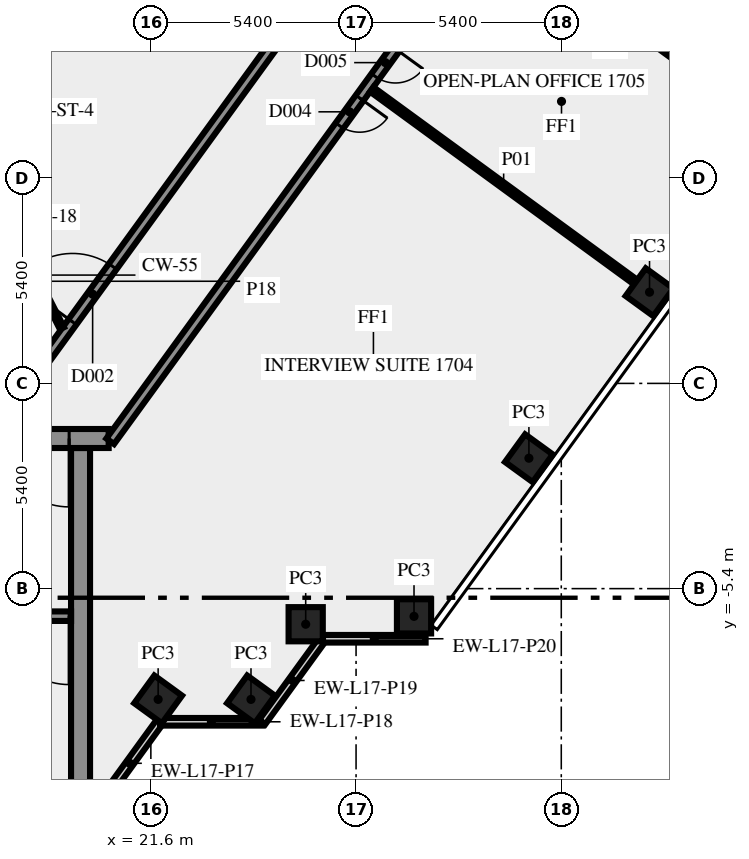
"""IFC4 building model, lengths in metres.
Left out: names, types, materials, properties, quantities, classifications, styles, units other than length and angle.
Written with IfcOpenShell. Run it as: python <this file> out.ifc"""

import sys

from ifc_helpers import new_model, si_unit, direction, frame, frame_2d, origin, origin_2d, place, context, subcontext, project, spatial, rectangle, extrude, element, fill, save


model = new_model("IFC4")
c1 = context("Model", 3, precision=1e-05, world=origin(), true_north=direction((0.0, 1.0)))
c2 = subcontext(c1, "Body", "Model", "MODEL_VIEW")
j1 = project(units=[si_unit("LENGTHUNIT", "METRE"), si_unit("PLANEANGLEUNIT", "RADIAN")], contexts=[c1])
p1 = place(None, origin())
s1 = spatial("IfcSite", under=j1, at=p1, CompositionType="ELEMENT")
p2 = place(p1, origin())
s2 = spatial("IfcBuilding", under=s1, at=p2, CompositionType="ELEMENT")
p3 = place(p2, frame((0.0, 0.0, 75.0)))
s3 = spatial("IfcBuildingStorey", under=s2, at=p3, CompositionType="ELEMENT", Elevation=75.0)
for number, where, z_axis, x_axis in (
    (1, (21.792, -8.315, 0.0), (0.0, 0.0, 1.0), (0.588, 0.809, 0.0)),
    (2, (24.235, -8.315, 0.0), (0.0, 0.0, 1.0), (0.588, 0.809, 0.0)),
    (3, (25.674, -6.337, 0.0), (0.0, 0.0, 1.0), (1.0, 0.0, 0.0)),
    (4, (28.525, -6.13, 0.0), (0.0, 0.0, 1.0), (1.0, 0.0, 0.0)),
    (5, (31.548, -1.969, 0.0), (0.0, 0.0, 1.0), (0.588, 0.809, 0.0)),
    (6, (34.722, 2.4, 0.0), (0.0, 0.0, 1.0), (0.588, 0.809, 0.0)),
):
    element("IfcColumn", number, at=place(p3, frame(where, z_axis=z_axis, x_axis=x_axis)), inside=s3, PredefinedType="COLUMN", context=c2, shape_type="SweptSolid", body=[
        extrude(rectangle(XDim=0.9, YDim=0.9, at=origin_2d()), origin(), (0.0, 0.0, 1.0), 3.4),
    ])
p4 = place(p3, frame((20.253, -11.083, 0.0), z_axis=(0.0, 0.0, 1.0), x_axis=(0.587766567315, 0.809030569476, 0.0)))
e7 = element("IfcWall", 7, at=p4, inside=s3, PredefinedType="SOLIDWALL", context=c2, shape_type="SweptSolid", body=[
    extrude(rectangle(XDim=2.688, YDim=0.2, at=frame_2d((1.344, 0.0))), origin(), (0.0, 0.0, 1.0), 3.4),
])
p5 = place(p3, frame((21.843, -8.904, 0.0), z_axis=(0.0, 0.0, 1.0), x_axis=(1.0, 0.0, 0.0)))
e8 = element("IfcWall", 8, at=p5, inside=s3, PredefinedType="SOLIDWALL", context=c2, shape_type="SweptSolid", body=[
    extrude(rectangle(XDim=2.7, YDim=0.2, at=frame_2d((1.35, 0.0))), origin(), (0.0, 0.0, 1.0), 3.4),
])
p6 = place(p3, frame((24.533, -8.909, 0.0), z_axis=(0.0, 0.0, 1.0), x_axis=(0.587720002413, 0.809064397168, 0.0)))
e9 = element("IfcWall", 9, at=p6, inside=s3, PredefinedType="SOLIDWALL", context=c2, shape_type="SweptSolid", body=[
    extrude(rectangle(XDim=2.7, YDim=0.2, at=frame_2d((1.35, 0.0))), origin(), (0.0, 0.0, 1.0), 3.4),
])
p7 = place(p3, frame((26.13, -6.719, 0.0), z_axis=(0.0, 0.0, 1.0), x_axis=(1.0, 0.0, 0.0)))
e10 = element("IfcWall", 10, at=p7, inside=s3, PredefinedType="SOLIDWALL", context=c2, shape_type="SweptSolid", body=[
    extrude(rectangle(XDim=2.7, YDim=0.2, at=frame_2d((1.35, 0.0))), origin(), (0.0, 0.0, 1.0), 3.4),
])
p8 = place(p3, frame((19.75, -10.5, 0.0), z_axis=(0.0, 0.0, 1.0), x_axis=(0.0, 1.0, 0.0)))
e11 = element("IfcWall", 11, at=p8, inside=s3, PredefinedType="SHEAR", context=c2, shape_type="SweptSolid", body=[
    extrude(rectangle(XDim=8.8, YDim=0.5, at=frame_2d((4.4, 0.0))), origin(), (0.0, 0.0, 1.0), 3.4),
])
p9 = place(p3, frame((19.5, -6.125, 0.0), z_axis=(0.0, 0.0, 1.0), x_axis=(-1.0, 0.0, 0.0)))
e12 = element("IfcWall", 12, at=p9, inside=s3, PredefinedType="SHEAR", context=c2, shape_type="SweptSolid", body=[
    extrude(rectangle(XDim=8.05, YDim=0.25, at=frame_2d((4.025, 0.0))), origin(), (0.0, 0.0, 1.0), 3.4),
])
p10 = place(p9, frame((0.05, 0.0, 0.0)))
e13 = element("IfcOpeningElement", 13, at=p10, cuts=e12, PredefinedType="OPENING", context=c2, shape_type="SweptSolid", body=[
    extrude(rectangle(XDim=1.8, YDim=2.1, at=frame_2d((0.9, 1.05))), frame((0.0, 0.135, 0.0), z_axis=(0.0, -1.0, 0.0), x_axis=(1.0, 0.0, 0.0)), (0.0, 0.0, 1.0), 0.27),
])
p11 = place(p3, frame((20.49, -1.45, 0.0), z_axis=(0.0, 0.0, 1.0), x_axis=(-1.0, 0.0, 0.0)))
e14 = element("IfcWall", 14, at=p11, inside=s3, PredefinedType="SHEAR", context=c2, shape_type="SweptSolid", body=[
    extrude(rectangle(XDim=40.98, YDim=0.5, at=frame_2d((20.49, 0.0))), origin(), (0.0, 0.0, 1.0), 3.4),
])
p12 = place(p11, frame((38.14, 0.0, 0.0)))
e15 = element("IfcOpeningElement", 15, at=p12, cuts=e14, PredefinedType="OPENING", context=c2, shape_type="SweptSolid", body=[
    extrude(rectangle(XDim=1.8, YDim=2.1, at=frame_2d((0.9, 1.05))), frame((0.0, 0.26, 0.0), z_axis=(0.0, -1.0, 0.0), x_axis=(1.0, 0.0, 0.0)), (0.0, 0.0, 1.0), 0.52),
])
p13 = place(p11, frame((35.89, 0.0, 0.0)))
e16 = element("IfcOpeningElement", 16, at=p13, cuts=e14, PredefinedType="OPENING", context=c2, shape_type="SweptSolid", body=[
    extrude(rectangle(XDim=0.9, YDim=2.1, at=frame_2d((0.45, 1.05))), frame((0.0, 0.26, 0.0), z_axis=(0.0, -1.0, 0.0), x_axis=(1.0, 0.0, 0.0)), (0.0, 0.0, 1.0), 0.52),
])
p14 = place(p11, frame((32.94, 0.0, 0.0)))
e17 = element("IfcOpeningElement", 17, at=p14, cuts=e14, PredefinedType="OPENING", context=c2, shape_type="SweptSolid", body=[
    extrude(rectangle(XDim=0.9, YDim=2.1, at=frame_2d((0.45, 1.05))), frame((0.0, 0.26, 0.0), z_axis=(0.0, -1.0, 0.0), x_axis=(1.0, 0.0, 0.0)), (0.0, 0.0, 1.0), 0.52),
])
p15 = place(p11, frame((21.765, 0.0, 0.0)))
e18 = element("IfcOpeningElement", 18, at=p15, cuts=e14, PredefinedType="OPENING", context=c2, shape_type="SweptSolid", body=[
    extrude(rectangle(XDim=2.0, YDim=2.1, at=frame_2d((1.0, 1.05))), frame((0.0, 0.26, 0.0), z_axis=(0.0, -1.0, 0.0), x_axis=(1.0, 0.0, 0.0)), (0.0, 0.0, 1.0), 0.52),
])
p16 = place(p11, frame((7.14, 0.0, 0.0)))
e19 = element("IfcOpeningElement", 19, at=p16, cuts=e14, PredefinedType="OPENING", context=c2, shape_type="SweptSolid", body=[
    extrude(rectangle(XDim=0.9, YDim=2.1, at=frame_2d((0.45, 1.05))), frame((0.0, 0.26, 0.0), z_axis=(0.0, -1.0, 0.0), x_axis=(1.0, 0.0, 0.0)), (0.0, 0.0, 1.0), 0.52),
])
p17 = place(p11, frame((5.028, 0.0, 0.0)))
e20 = element("IfcOpeningElement", 20, at=p17, cuts=e14, PredefinedType="OPENING", context=c2, shape_type="SweptSolid", body=[
    extrude(rectangle(XDim=0.8, YDim=2.1, at=frame_2d((0.4, 1.05))), frame((0.0, 0.26, 0.0), z_axis=(0.0, -1.0, 0.0), x_axis=(1.0, 0.0, 0.0)), (0.0, 0.0, 1.0), 0.52),
])
p18 = place(p11, frame((3.452, 0.0, 0.0)))
e21 = element("IfcOpeningElement", 21, at=p18, cuts=e14, PredefinedType="OPENING", context=c2, shape_type="SweptSolid", body=[
    extrude(rectangle(XDim=0.8, YDim=2.1, at=frame_2d((0.4, 1.05))), frame((0.0, 0.26, 0.0), z_axis=(0.0, -1.0, 0.0), x_axis=(1.0, 0.0, 0.0)), (0.0, 0.0, 1.0), 0.52),
])
p19 = place(p11, frame((1.04, 0.0, 0.0)))
e22 = element("IfcOpeningElement", 22, at=p19, cuts=e14, PredefinedType="OPENING", context=c2, shape_type="SweptSolid", body=[
    extrude(rectangle(XDim=1.8, YDim=2.1, at=frame_2d((0.9, 1.05))), frame((0.0, 0.26, 0.0), z_axis=(0.0, -1.0, 0.0), x_axis=(1.0, 0.0, 0.0)), (0.0, 0.0, 1.0), 0.52),
])
p20 = place(p3, frame((17.545, -1.125, 0.0), z_axis=(0.0, 0.0, 1.0), x_axis=(0.587786323093, 0.809016216391, 0.0)))
e23 = element("IfcWall", 23, at=p20, inside=s3, PredefinedType="SOLIDWALL", context=c2, shape_type="SweptSolid", body=[
    extrude(rectangle(XDim=33.493, YDim=0.25, at=frame_2d((16.747, 0.0))), origin(), (0.0, 0.0, 1.0), 3.4),
])
p21 = place(p20, frame((27.458, 0.0, 0.0)))
e24 = element("IfcOpeningElement", 24, at=p21, cuts=e23, PredefinedType="OPENING", context=c2, shape_type="SweptSolid", body=[
    extrude(rectangle(XDim=1.8, YDim=2.1, at=frame_2d((0.9, 1.05))), frame((0.0, 0.135, 0.0), z_axis=(0.0, -1.0, 0.0), x_axis=(1.0, 0.0, 0.0)), (0.0, 0.0, 1.0), 0.27),
])
p22 = place(p20, frame((3.392, 0.0, 0.0)))
e25 = element("IfcOpeningElement", 25, at=p22, cuts=e23, PredefinedType="OPENING", context=c2, shape_type="SweptSolid", body=[
    extrude(rectangle(XDim=1.8, YDim=2.1, at=frame_2d((0.9, 1.05))), frame((0.0, 0.135, 0.0), z_axis=(0.0, -1.0, 0.0), x_axis=(1.0, 0.0, 0.0)), (0.0, 0.0, 1.0), 0.27),
])
p23 = place(p20, frame((32.253, 0.0, 0.0)))
e26 = element("IfcOpeningElement", 26, at=p23, cuts=e23, PredefinedType="OPENING", context=c2, shape_type="SweptSolid", body=[
    extrude(rectangle(XDim=0.9, YDim=2.1, at=frame_2d((0.45, 1.05))), frame((0.0, 0.135, 0.0), z_axis=(0.0, -1.0, 0.0), x_axis=(1.0, 0.0, 0.0)), (0.0, 0.0, 1.0), 0.27),
])
p24 = place(p3, frame((43.467, 30.045, 0.0), z_axis=(0.0, 0.0, 1.0), x_axis=(-0.587784726077, -0.809017376692, 0.0)))
e27 = element("IfcWall", 27, at=p24, inside=s3, PredefinedType="SOLIDWALL", context=c2, shape_type="SweptSolid", body=[
    extrude(rectangle(XDim=39.02, YDim=0.25, at=frame_2d((19.51, 0.0))), origin(), (0.0, 0.0, 1.0), 3.4),
])
p25 = place(p24, frame((26.254, 0.0, 0.0)))
e28 = element("IfcOpeningElement", 28, at=p25, cuts=e27, PredefinedType="OPENING", context=c2, shape_type="SweptSolid", body=[
    extrude(rectangle(XDim=0.9, YDim=2.1, at=frame_2d((0.45, 1.05))), frame((0.0, 0.135, 0.0), z_axis=(0.0, -1.0, 0.0), x_axis=(1.0, 0.0, 0.0)), (0.0, 0.0, 1.0), 0.27),
])
p26 = place(p24, frame((2.205, 0.0, 0.0)))
e29 = element("IfcOpeningElement", 29, at=p26, cuts=e27, PredefinedType="OPENING", context=c2, shape_type="SweptSolid", body=[
    extrude(rectangle(XDim=0.9, YDim=2.1, at=frame_2d((0.45, 1.05))), frame((0.0, 0.135, 0.0), z_axis=(0.0, -1.0, 0.0), x_axis=(1.0, 0.0, 0.0)), (0.0, 0.0, 1.0), 0.27),
])
p27 = place(p24, frame((27.855, 0.0, 0.0)))
e30 = element("IfcOpeningElement", 30, at=p27, cuts=e27, PredefinedType="OPENING", context=c2, shape_type="SweptSolid", body=[
    extrude(rectangle(XDim=0.9, YDim=2.1, at=frame_2d((0.45, 1.05))), frame((0.0, 0.135, 0.0), z_axis=(0.0, -1.0, 0.0), x_axis=(1.0, 0.0, 0.0)), (0.0, 0.0, 1.0), 0.27),
])
p28 = place(p24, frame((18.155, 0.0, 0.0)))
e31 = element("IfcOpeningElement", 31, at=p28, cuts=e27, PredefinedType="OPENING", context=c2, shape_type="SweptSolid", body=[
    extrude(rectangle(XDim=0.9, YDim=2.1, at=frame_2d((0.45, 1.05))), frame((0.0, 0.135, 0.0), z_axis=(0.0, -1.0, 0.0), x_axis=(1.0, 0.0, 0.0)), (0.0, 0.0, 1.0), 0.27),
])
p29 = place(p24, frame((19.755, 0.0, 0.0)))
e32 = element("IfcOpeningElement", 32, at=p29, cuts=e27, PredefinedType="OPENING", context=c2, shape_type="SweptSolid", body=[
    extrude(rectangle(XDim=0.9, YDim=2.1, at=frame_2d((0.45, 1.05))), frame((0.0, 0.135, 0.0), z_axis=(0.0, -1.0, 0.0), x_axis=(1.0, 0.0, 0.0)), (0.0, 0.0, 1.0), 0.27),
])
p30 = place(p24, frame((0.224, 0.0, 0.0)))
e33 = element("IfcOpeningElement", 33, at=p30, cuts=e27, PredefinedType="OPENING", context=c2, shape_type="SweptSolid", body=[
    extrude(rectangle(XDim=0.9, YDim=2.1, at=frame_2d((0.45, 1.05))), frame((0.0, 0.135, 0.0), z_axis=(0.0, -1.0, 0.0), x_axis=(1.0, 0.0, 0.0)), (0.0, 0.0, 1.0), 0.27),
])
p31 = place(p3, frame((27.413, 7.735, 0.0), z_axis=(0.0, 0.0, 1.0), x_axis=(0.807664804385, -0.589641894507, 0.0)))
e34 = element("IfcWall", 34, at=p31, inside=s3, PredefinedType="PARTITIONING", context=c2, shape_type="SweptSolid", body=[
    extrude(rectangle(XDim=8.594, YDim=0.15, at=frame_2d((4.297, 0.0))), origin(), (0.0, 0.0, 1.0), 3.4),
])
p32 = place(p3, frame((37.516, 7.02, 0.0), z_axis=(0.0, 0.0, 1.0), x_axis=(-0.809002556908, 0.587805123248, 0.0)))
e35 = element("IfcWall", 35, at=p32, inside=s3, PredefinedType="PARTITIONING", context=c2, shape_type="SweptSolid", body=[
    extrude(rectangle(XDim=8.595, YDim=0.12, at=frame_2d((4.297, 0.0))), origin(), (0.0, 0.0, 1.0), 3.4),
])
p33 = place(p3, frame((32.174, 14.288, 0.0), z_axis=(0.0, 0.0, 1.0), x_axis=(0.807664588563, -0.589642190131, 0.0)))
e36 = element("IfcWall", 36, at=p33, inside=s3, PredefinedType="PARTITIONING", context=c2, shape_type="SweptSolid", body=[
    extrude(rectangle(XDim=9.55, YDim=0.12, at=frame_2d((4.775, 0.0))), origin(), (0.0, 0.0, 1.0), 2.5),
])
p34 = place(p3, frame((18.0, 3.925, 0.0), z_axis=(0.0, 0.0, 1.0), x_axis=(0.453950796792, -0.891026752736, 0.0)))
e37 = element("IfcWall", 37, at=p34, inside=s3, PredefinedType="PARTITIONING", context=c2, shape_type="SweptSolid", body=[
    extrude(rectangle(XDim=2.778, YDim=0.12, at=frame_2d((1.389, 0.0))), origin(), (0.0, 0.0, 1.0), 3.4),
])
p35 = place(p10, origin())
e38 = element("IfcDoor", 38, at=p35, inside=s3, OperationType="DOUBLE_DOOR_SINGLE_SWING", PredefinedType="DOOR", context=c2, shape_type="SweptSolid", body=[
    extrude(rectangle(XDim=1.8, YDim=2.1, at=frame_2d((0.9, 1.05))), frame((0.0, 0.025, 0.0), z_axis=(0.0, -1.0, 0.0), x_axis=(1.0, 0.0, 0.0)), (0.0, 0.0, 1.0), 0.05),
])
fill(e13, e38)
p36 = place(p19, origin())
e39 = element("IfcDoor", 39, at=p36, inside=s3, OperationType="DOUBLE_DOOR_SINGLE_SWING", PredefinedType="DOOR", context=c2, shape_type="SweptSolid", body=[
    extrude(rectangle(XDim=1.8, YDim=2.1, at=frame_2d((0.9, 1.05))), frame((0.0, 0.025, 0.0), z_axis=(0.0, -1.0, 0.0), x_axis=(1.0, 0.0, 0.0)), (0.0, 0.0, 1.0), 0.05),
])
fill(e22, e39)
p37 = place(p25, origin())
e40 = element("IfcDoor", 40, at=p37, inside=s3, OperationType="SINGLE_SWING_RIGHT", PredefinedType="DOOR", context=c2, shape_type="SweptSolid", body=[
    extrude(rectangle(XDim=0.9, YDim=2.1, at=frame_2d((0.45, 1.05))), frame((0.0, 0.025, 0.0), z_axis=(0.0, -1.0, 0.0), x_axis=(1.0, 0.0, 0.0)), (0.0, 0.0, 1.0), 0.05),
])
fill(e28, e40)
p38 = place(p22, origin())
e41 = element("IfcDoor", 41, at=p38, inside=s3, OperationType="DOUBLE_DOOR_SINGLE_SWING", PredefinedType="DOOR", context=c2, shape_type="SweptSolid", body=[
    extrude(rectangle(XDim=1.8, YDim=2.1, at=frame_2d((0.9, 1.05))), frame((0.0, 0.025, 0.0), z_axis=(0.0, -1.0, 0.0), x_axis=(1.0, 0.0, 0.0)), (0.0, 0.0, 1.0), 0.05),
])
fill(e25, e41)
p39 = place(p27, origin())
e42 = element("IfcDoor", 42, at=p39, inside=s3, OperationType="SINGLE_SWING_LEFT", PredefinedType="DOOR", context=c2, shape_type="SweptSolid", body=[
    extrude(rectangle(XDim=0.9, YDim=2.1, at=frame_2d((0.45, 1.05))), frame((0.0, 0.025, 0.0), z_axis=(0.0, -1.0, 0.0), x_axis=(1.0, 0.0, 0.0)), (0.0, 0.0, 1.0), 0.05),
])
fill(e30, e42)
save(model, sys.argv[1])
